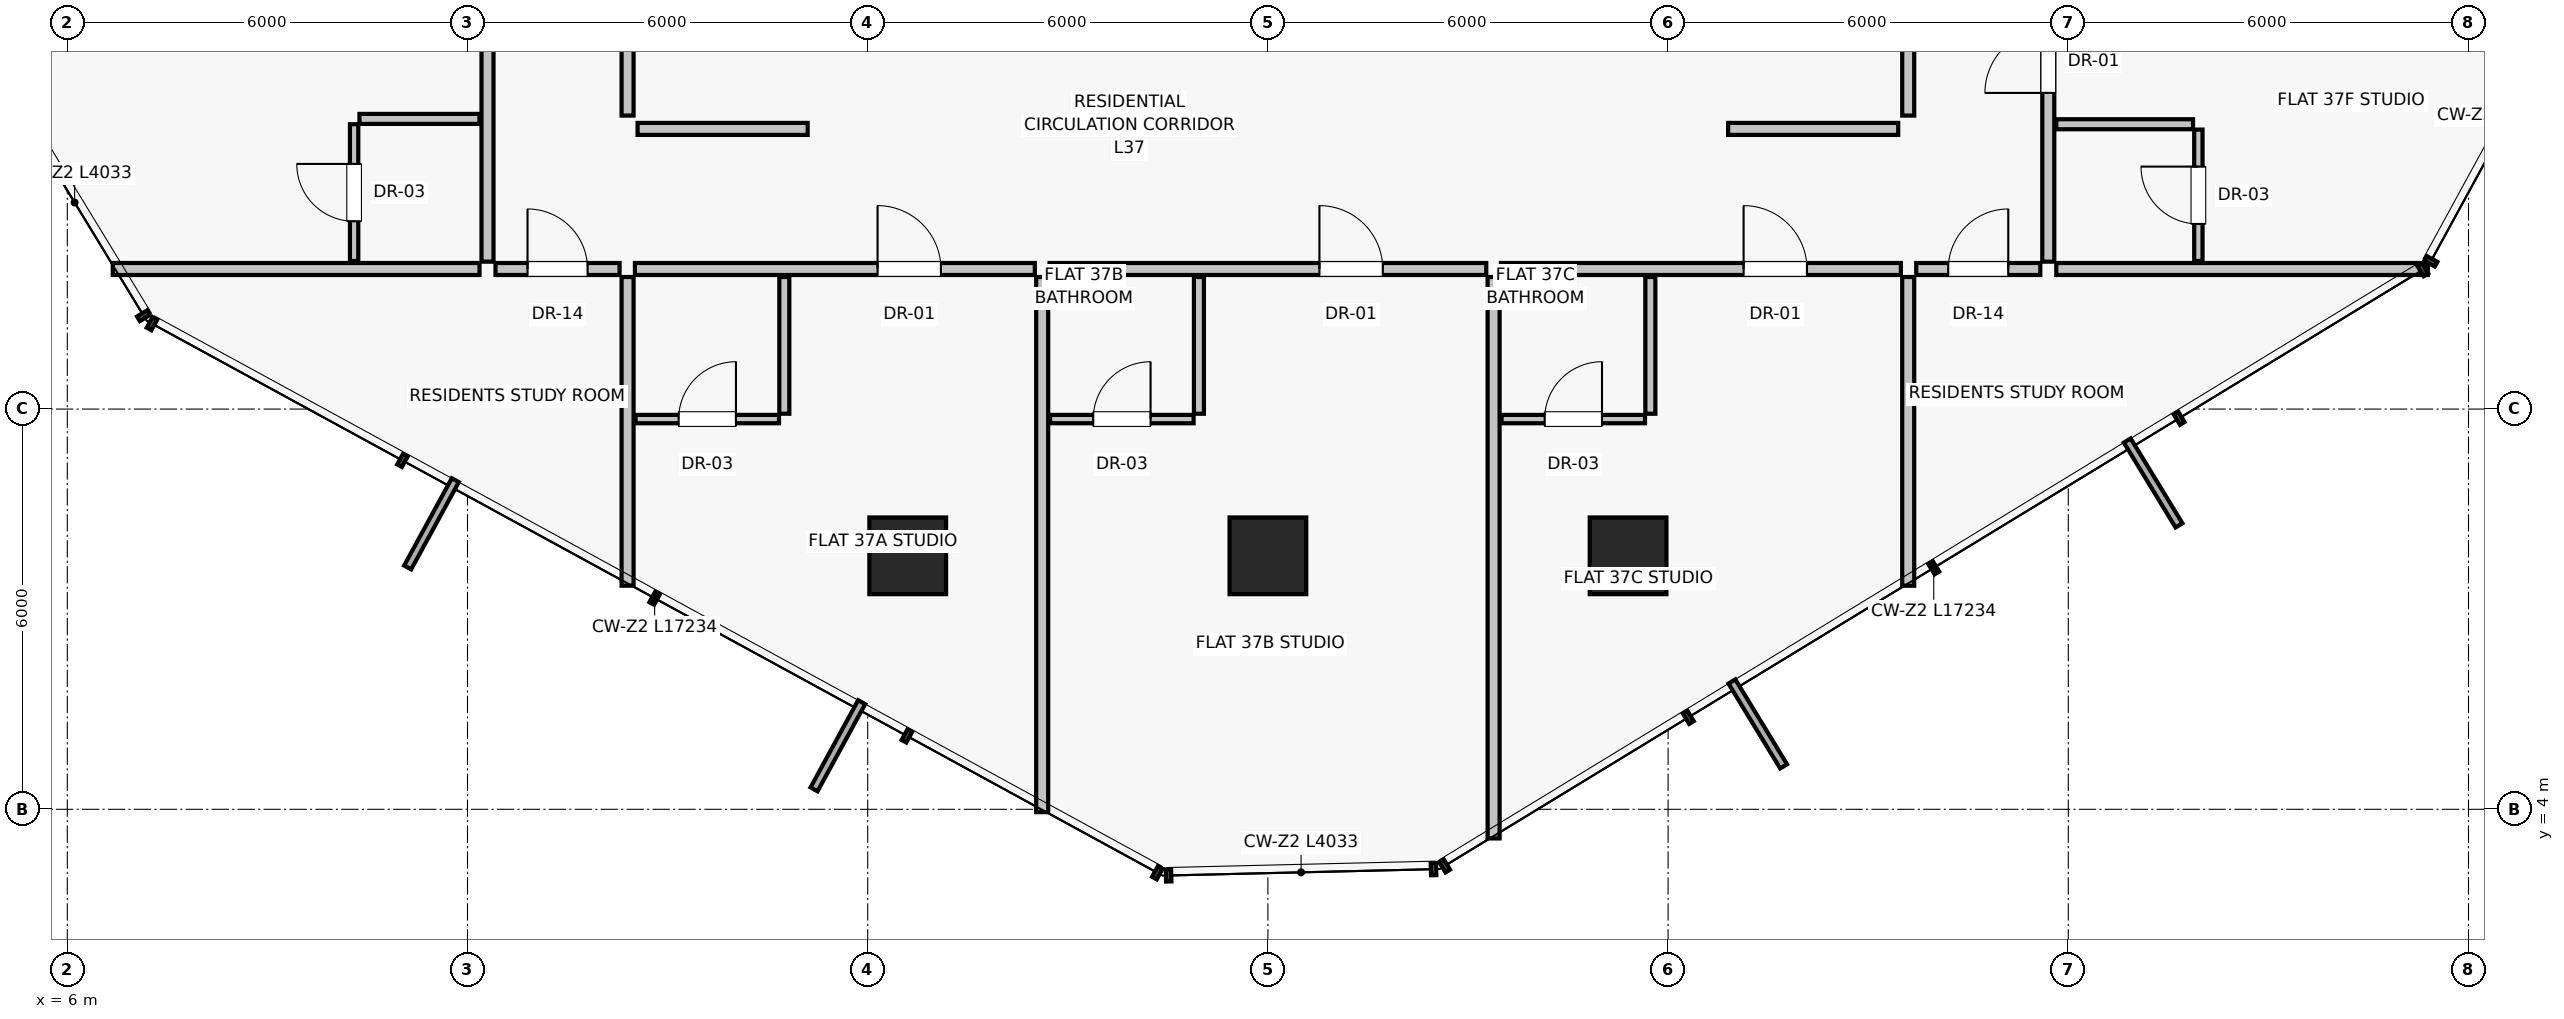
"""IFC4 building model, lengths in metres.
Left out: names, types, materials, properties, quantities, classifications, styles, units other than length and angle.
Written with IfcOpenShell. Run it as: python <this file> out.ifc"""

import sys

from ifc_helpers import new_model, si_unit, direction, frame, frame_2d, origin, origin_2d, place, context, subcontext, project, spatial, rectangle, extrude, source, transform, mapped, element, fill, save


model = new_model("IFC4")
c1 = context("Model", 3, precision=1e-05, world=origin(), true_north=direction((0.0, 1.0)))
c2 = subcontext(c1, "Body", "Model", "MODEL_VIEW")
j1 = project(units=[si_unit("LENGTHUNIT", "METRE"), si_unit("PLANEANGLEUNIT", "RADIAN")], contexts=[c1])
p1 = place(None, origin())
s1 = spatial("IfcSite", under=j1, at=p1, CompositionType="ELEMENT")
p2 = place(p1, origin())
s2 = spatial("IfcBuilding", under=s1, at=p2, CompositionType="ELEMENT")
p3 = place(p2, frame((0.0, 0.0, 132.75)))
s3 = spatial("IfcBuildingStorey", under=s2, at=p3, CompositionType="ELEMENT", Elevation=132.75)
for number, where, z_axis, x_axis in (
    (1, (18.6, 7.8, 0.0), (0.0, 0.0, 1.0), (1.0, 0.0, 0.0)),
    (2, (24.0, 7.8, 0.0), (0.0, 0.0, 1.0), (1.0, 0.0, 0.0)),
    (3, (29.4, 7.8, 0.0), (0.0, 0.0, 1.0), (1.0, 0.0, 0.0)),
):
    element("IfcColumn", number, at=place(p3, frame(where, z_axis=z_axis, x_axis=x_axis)), inside=s3, PredefinedType="COLUMN", context=c2, shape_type="SweptSolid", body=[
        extrude(rectangle(XDim=1.15, YDim=1.15, at=origin_2d()), origin(), (0.0, 0.0, 1.0), 3.25),
    ])
p4 = place(p3, frame((14.4, 14.4, 0.0), z_axis=(0.0, 0.0, 1.0), x_axis=(0.0, 1.0, 0.0)))
e4 = element("IfcWall", 4, at=p4, inside=s3, PredefinedType="PARTITIONING", context=c2, shape_type="SweptSolid", body=[
    extrude(rectangle(XDim=9.4, YDim=0.18, at=frame_2d((4.7, 0.0))), origin(), (0.0, 0.0, 1.0), 3.0),
])
p5 = place(p4, frame((3.8, 0.0, 0.0)))
e5 = element("IfcOpeningElement", 5, at=p5, cuts=e4, PredefinedType="OPENING", context=c2, shape_type="SweptSolid", body=[
    extrude(rectangle(XDim=0.9, YDim=2.01, at=frame_2d((0.45, 1.005))), frame((0.0, 0.1, 0.0), z_axis=(0.0, -1.0, 0.0), x_axis=(1.0, 0.0, 0.0)), (0.0, 0.0, 1.0), 0.2),
])
p6 = place(p3, frame((33.6, 14.4, 0.0), z_axis=(0.0, 0.0, 1.0), x_axis=(0.0, 1.0, 0.0)))
e6 = element("IfcWall", 6, at=p6, inside=s3, PredefinedType="PARTITIONING", context=c2, shape_type="SweptSolid", body=[
    extrude(rectangle(XDim=9.4, YDim=0.18, at=frame_2d((4.7, 0.0))), origin(), (0.0, 0.0, 1.0), 3.0),
])
p7 = place(p6, frame((3.8, 0.0, 0.0)))
e7 = element("IfcOpeningElement", 7, at=p7, cuts=e6, PredefinedType="OPENING", context=c2, shape_type="SweptSolid", body=[
    extrude(rectangle(XDim=0.9, YDim=2.01, at=frame_2d((0.45, 1.005))), frame((0.0, 0.1, 0.0), z_axis=(0.0, -1.0, 0.0), x_axis=(1.0, 0.0, 0.0)), (0.0, 0.0, 1.0), 0.2),
])
for number, where, z_axis, x_axis in (
    (8, (14.55, 14.2, 0.0), (0.0, 0.0, 1.0), (1.0, 0.0, 0.0)),
    (9, (30.9, 14.2, 0.0), (0.0, 0.0, 1.0), (1.0, 0.0, 0.0)),
):
    element("IfcWall", number, at=place(p3, frame(where, z_axis=z_axis, x_axis=x_axis)), inside=s3, PredefinedType="PARTITIONING", context=c2, shape_type="SweptSolid", body=[
        extrude(rectangle(XDim=2.55, YDim=0.18, at=frame_2d((1.275, 0.0))), origin(), (0.0, 0.0, 1.0), 3.0),
    ])
p8 = place(p3, frame((14.4, 11.98, 0.0), z_axis=(0.0, 0.0, 1.0), x_axis=(0.0, -1.0, 0.0)))
e10 = element("IfcWall", 10, at=p8, inside=s3, PredefinedType="PARTITIONING", context=c2, shape_type="SweptSolid", body=[
    extrude(rectangle(XDim=4.628, YDim=0.18, at=frame_2d((2.314, 0.0))), origin(), (0.0, 0.0, 1.0), 3.0),
])
p9 = place(p3, frame((33.6, 11.98, 0.0), z_axis=(0.0, 0.0, 1.0), x_axis=(0.0, -1.0, 0.0)))
e11 = element("IfcWall", 11, at=p9, inside=s3, PredefinedType="PARTITIONING", context=c2, shape_type="SweptSolid", body=[
    extrude(rectangle(XDim=4.629, YDim=0.18, at=frame_2d((2.314, 0.0))), origin(), (0.0, 0.0, 1.0), 3.0),
])
p10 = place(p3, frame((14.51, 12.1, 0.0), z_axis=(0.0, 0.0, 1.0), x_axis=(1.0, 0.0, 0.0)))
e12 = element("IfcWall", 12, at=p10, inside=s3, PredefinedType="PARTITIONING", context=c2, shape_type="SweptSolid", body=[
    extrude(rectangle(XDim=5.996, YDim=0.18, at=frame_2d((2.998, 0.0))), origin(), (0.0, 0.0, 1.0), 2.58),
])
p11 = place(p10, frame((3.638, 0.0, 0.0)))
e13 = element("IfcOpeningElement", 13, at=p11, cuts=e12, PredefinedType="OPENING", context=c2, shape_type="SweptSolid", body=[
    extrude(rectangle(XDim=0.95, YDim=2.02, at=frame_2d((0.475, 1.01))), frame((0.0, 0.1, 0.0), z_axis=(0.0, -1.0, 0.0), x_axis=(1.0, 0.0, 0.0)), (0.0, 0.0, 1.0), 0.2),
])
p12 = place(p3, frame((16.75, 11.98, 0.0), z_axis=(0.0, 0.0, 1.0), x_axis=(0.0, -1.0, 0.0)))
e14 = element("IfcWall", 14, at=p12, inside=s3, PredefinedType="PARTITIONING", context=c2, shape_type="SweptSolid", body=[
    extrude(rectangle(XDim=2.05, YDim=0.15, at=frame_2d((1.025, 0.0))), origin(), (0.0, 0.0, 1.0), 3.0),
])
p13 = place(p3, frame((14.52, 9.85, 0.0), z_axis=(0.0, 0.0, 1.0), x_axis=(1.0, 0.0, 0.0)))
e15 = element("IfcWall", 15, at=p13, inside=s3, PredefinedType="PARTITIONING", context=c2, shape_type="SweptSolid", body=[
    extrude(rectangle(XDim=2.15, YDim=0.125, at=frame_2d((1.075, 0.0))), origin(), (0.0, 0.0, 1.0), 3.0),
])
p14 = place(p13, frame((0.645, 0.0, 0.0)))
e16 = element("IfcOpeningElement", 16, at=p14, cuts=e15, PredefinedType="OPENING", context=c2, shape_type="SweptSolid", body=[
    extrude(rectangle(XDim=0.86, YDim=2.01, at=frame_2d((0.43, 1.005))), frame((0.0, 0.073, 0.0), z_axis=(0.0, -1.0, 0.0), x_axis=(1.0, 0.0, 0.0)), (0.0, 0.0, 1.0), 0.145),
])
p15 = place(p3, frame((20.616, 11.98, 0.0), z_axis=(0.0, 0.0, 1.0), x_axis=(0.0, -1.0, 0.0)))
e17 = element("IfcWall", 17, at=p15, inside=s3, PredefinedType="PARTITIONING", context=c2, shape_type="SweptSolid", body=[
    extrude(rectangle(XDim=8.023, YDim=0.18, at=frame_2d((4.011, 0.0))), origin(), (0.0, 0.0, 1.0), 3.0),
])
p16 = place(p3, frame((20.726, 12.1, 0.0), z_axis=(0.0, 0.0, 1.0), x_axis=(1.0, 0.0, 0.0)))
e18 = element("IfcWall", 18, at=p16, inside=s3, PredefinedType="PARTITIONING", context=c2, shape_type="SweptSolid", body=[
    extrude(rectangle(XDim=6.548, YDim=0.18, at=frame_2d((3.274, 0.0))), origin(), (0.0, 0.0, 1.0), 2.58),
])
p17 = place(p16, frame((4.046, 0.0, 0.0)))
e19 = element("IfcOpeningElement", 19, at=p17, cuts=e18, PredefinedType="OPENING", context=c2, shape_type="SweptSolid", body=[
    extrude(rectangle(XDim=0.95, YDim=2.02, at=frame_2d((0.475, 1.01))), frame((0.0, 0.1, 0.0), z_axis=(0.0, -1.0, 0.0), x_axis=(1.0, 0.0, 0.0)), (0.0, 0.0, 1.0), 0.2),
])
p18 = place(p3, frame((22.966, 11.98, 0.0), z_axis=(0.0, 0.0, 1.0), x_axis=(0.0, -1.0, 0.0)))
e20 = element("IfcWall", 20, at=p18, inside=s3, PredefinedType="PARTITIONING", context=c2, shape_type="SweptSolid", body=[
    extrude(rectangle(XDim=2.05, YDim=0.15, at=frame_2d((1.025, 0.0))), origin(), (0.0, 0.0, 1.0), 3.0),
])
p19 = place(p3, frame((20.736, 9.85, 0.0), z_axis=(0.0, 0.0, 1.0), x_axis=(1.0, 0.0, 0.0)))
e21 = element("IfcWall", 21, at=p19, inside=s3, PredefinedType="PARTITIONING", context=c2, shape_type="SweptSolid", body=[
    extrude(rectangle(XDim=2.15, YDim=0.125, at=frame_2d((1.075, 0.0))), origin(), (0.0, 0.0, 1.0), 3.0),
])
p20 = place(p19, frame((0.645, 0.0, 0.0)))
e22 = element("IfcOpeningElement", 22, at=p20, cuts=e21, PredefinedType="OPENING", context=c2, shape_type="SweptSolid", body=[
    extrude(rectangle(XDim=0.86, YDim=2.01, at=frame_2d((0.43, 1.005))), frame((0.0, 0.073, 0.0), z_axis=(0.0, -1.0, 0.0), x_axis=(1.0, 0.0, 0.0)), (0.0, 0.0, 1.0), 0.145),
])
p21 = place(p3, frame((27.384, 11.98, 0.0), z_axis=(0.0, 0.0, 1.0), x_axis=(0.0, -1.0, 0.0)))
e23 = element("IfcWall", 23, at=p21, inside=s3, PredefinedType="PARTITIONING", context=c2, shape_type="SweptSolid", body=[
    extrude(rectangle(XDim=8.417, YDim=0.18, at=frame_2d((4.208, 0.0))), origin(), (0.0, 0.0, 1.0), 3.0),
])
p22 = place(p3, frame((27.494, 12.1, 0.0), z_axis=(0.0, 0.0, 1.0), x_axis=(1.0, 0.0, 0.0)))
e24 = element("IfcWall", 24, at=p22, inside=s3, PredefinedType="PARTITIONING", context=c2, shape_type="SweptSolid", body=[
    extrude(rectangle(XDim=5.996, YDim=0.18, at=frame_2d((2.998, 0.0))), origin(), (0.0, 0.0, 1.0), 2.58),
])
p23 = place(p22, frame((3.638, 0.0, 0.0)))
e25 = element("IfcOpeningElement", 25, at=p23, cuts=e24, PredefinedType="OPENING", context=c2, shape_type="SweptSolid", body=[
    extrude(rectangle(XDim=0.95, YDim=2.02, at=frame_2d((0.475, 1.01))), frame((0.0, 0.1, 0.0), z_axis=(0.0, -1.0, 0.0), x_axis=(1.0, 0.0, 0.0)), (0.0, 0.0, 1.0), 0.2),
])
p24 = place(p3, frame((29.734, 11.98, 0.0), z_axis=(0.0, 0.0, 1.0), x_axis=(0.0, -1.0, 0.0)))
e26 = element("IfcWall", 26, at=p24, inside=s3, PredefinedType="PARTITIONING", context=c2, shape_type="SweptSolid", body=[
    extrude(rectangle(XDim=2.05, YDim=0.15, at=frame_2d((1.025, 0.0))), origin(), (0.0, 0.0, 1.0), 2.378),
])
p25 = place(p3, frame((27.504, 9.85, 0.0), z_axis=(0.0, 0.0, 1.0), x_axis=(1.0, 0.0, 0.0)))
e27 = element("IfcWall", 27, at=p25, inside=s3, PredefinedType="PARTITIONING", context=c2, shape_type="SweptSolid", body=[
    extrude(rectangle(XDim=2.15, YDim=0.125, at=frame_2d((1.075, 0.0))), origin(), (0.0, 0.0, 1.0), 3.0),
])
p26 = place(p25, frame((0.645, 0.0, 0.0)))
e28 = element("IfcOpeningElement", 28, at=p26, cuts=e27, PredefinedType="OPENING", context=c2, shape_type="SweptSolid", body=[
    extrude(rectangle(XDim=0.86, YDim=2.01, at=frame_2d((0.43, 1.005))), frame((0.0, 0.073, 0.0), z_axis=(0.0, -1.0, 0.0), x_axis=(1.0, 0.0, 0.0)), (0.0, 0.0, 1.0), 0.145),
])
p27 = place(p3, frame((12.18, 12.1, 0.0), z_axis=(0.0, 0.0, 1.0), x_axis=(-1.0, 0.0, 0.0)))
e29 = element("IfcWall", 29, at=p27, inside=s3, PredefinedType="PARTITIONING", context=c2, shape_type="SweptSolid", body=[
    extrude(rectangle(XDim=5.498, YDim=0.18, at=frame_2d((2.749, 0.0))), origin(), (0.0, 0.0, 1.0), 3.0),
])
p28 = place(p3, frame((12.3, 12.21, 0.0), z_axis=(0.0, 0.0, 1.0), x_axis=(0.0, 1.0, 0.0)))
e30 = element("IfcWall", 30, at=p28, inside=s3, PredefinedType="PARTITIONING", context=c2, shape_type="SweptSolid", body=[
    extrude(rectangle(XDim=13.308, YDim=0.18, at=frame_2d((6.654, 0.0))), origin(), (0.0, 0.0, 1.0), 2.58),
])
p29 = place(p28, frame((4.26, 0.0, 0.0)))
e31 = element("IfcOpeningElement", 31, at=p29, cuts=e30, PredefinedType="OPENING", context=c2, shape_type="SweptSolid", body=[
    extrude(rectangle(XDim=0.95, YDim=2.02, at=frame_2d((0.475, 1.01))), frame((0.0, 0.1, 0.0), z_axis=(0.0, -1.0, 0.0), x_axis=(1.0, 0.0, 0.0)), (0.0, 0.0, 1.0), 0.2),
])
p30 = place(p3, frame((12.18, 14.35, 0.0), z_axis=(0.0, 0.0, 1.0), x_axis=(-1.0, 0.0, 0.0)))
e32 = element("IfcWall", 32, at=p30, inside=s3, PredefinedType="PARTITIONING", context=c2, shape_type="SweptSolid", body=[
    extrude(rectangle(XDim=1.8, YDim=0.15, at=frame_2d((0.9, 0.0))), origin(), (0.0, 0.0, 1.0), 3.0),
])
p31 = place(p3, frame((10.3, 12.22, 0.0), z_axis=(0.0, 0.0, 1.0), x_axis=(0.0, 1.0, 0.0)))
e33 = element("IfcWall", 33, at=p31, inside=s3, PredefinedType="PARTITIONING", context=c2, shape_type="SweptSolid", body=[
    extrude(rectangle(XDim=2.05, YDim=0.125, at=frame_2d((1.025, 0.0))), origin(), (0.0, 0.0, 1.0), 3.0),
])
p32 = place(p31, frame((0.595, 0.0, 0.0)))
e34 = element("IfcOpeningElement", 34, at=p32, cuts=e33, PredefinedType="OPENING", context=c2, shape_type="SweptSolid", body=[
    extrude(rectangle(XDim=0.86, YDim=2.01, at=frame_2d((0.43, 1.005))), frame((0.0, 0.073, 0.0), z_axis=(0.0, -1.0, 0.0), x_axis=(1.0, 0.0, 0.0)), (0.0, 0.0, 1.0), 0.145),
])
p33 = place(p3, frame((35.82, 12.1, 0.0), z_axis=(0.0, 0.0, 1.0), x_axis=(1.0, 0.0, 0.0)))
e35 = element("IfcWall", 35, at=p33, inside=s3, PredefinedType="PARTITIONING", context=c2, shape_type="SweptSolid", body=[
    extrude(rectangle(XDim=5.572, YDim=0.18, at=frame_2d((2.786, 0.0))), origin(), (0.0, 0.0, 1.0), 3.0),
])
p34 = place(p3, frame((35.7, 12.21, 0.0), z_axis=(0.0, 0.0, 1.0), x_axis=(0.0, 1.0, 0.0)))
e36 = element("IfcWall", 36, at=p34, inside=s3, PredefinedType="PARTITIONING", context=c2, shape_type="SweptSolid", body=[
    extrude(rectangle(XDim=4.498, YDim=0.18, at=frame_2d((2.249, 0.0))), origin(), (0.0, 0.0, 1.0), 3.0),
])
p35 = place(p34, frame((2.53, 0.0, 0.0)))
e37 = element("IfcOpeningElement", 37, at=p35, cuts=e36, PredefinedType="OPENING", context=c2, shape_type="SweptSolid", body=[
    extrude(rectangle(XDim=0.95, YDim=2.02, at=frame_2d((0.475, 1.01))), frame((0.0, 0.1, 0.0), z_axis=(0.0, -1.0, 0.0), x_axis=(1.0, 0.0, 0.0)), (0.0, 0.0, 1.0), 0.2),
])
p36 = place(p3, frame((35.82, 14.27, 0.0), z_axis=(0.0, 0.0, 1.0), x_axis=(1.0, 0.0, 0.0)))
e38 = element("IfcWall", 38, at=p36, inside=s3, PredefinedType="PARTITIONING", context=c2, shape_type="SweptSolid", body=[
    extrude(rectangle(XDim=2.05, YDim=0.15, at=frame_2d((1.025, 0.0))), origin(), (0.0, 0.0, 1.0), 3.0),
])
p37 = place(p3, frame((37.95, 12.22, 0.0), z_axis=(0.0, 0.0, 1.0), x_axis=(0.0, 1.0, 0.0)))
e39 = element("IfcWall", 39, at=p37, inside=s3, PredefinedType="PARTITIONING", context=c2, shape_type="SweptSolid", body=[
    extrude(rectangle(XDim=1.97, YDim=0.125, at=frame_2d((0.985, 0.0))), origin(), (0.0, 0.0, 1.0), 3.0),
])
p38 = place(p37, frame((0.555, 0.0, 0.0)))
e40 = element("IfcOpeningElement", 40, at=p38, cuts=e39, PredefinedType="OPENING", context=c2, shape_type="SweptSolid", body=[
    extrude(rectangle(XDim=0.86, YDim=2.01, at=frame_2d((0.43, 1.005))), frame((0.0, 0.073, 0.0), z_axis=(0.0, -1.0, 0.0), x_axis=(1.0, 0.0, 0.0)), (0.0, 0.0, 1.0), 0.145),
])
p39 = place(p3, frame((12.42, 12.1, 0.0), z_axis=(0.0, 0.0, 1.0), x_axis=(1.0, 0.0, 0.0)))
e41 = element("IfcWall", 41, at=p39, inside=s3, PredefinedType="PARTITIONING", context=c2, shape_type="SweptSolid", body=[
    extrude(rectangle(XDim=1.86, YDim=0.18, at=frame_2d((0.93, 0.0))), origin(), (0.0, 0.0, 1.0), 3.0),
])
p40 = place(p39, frame((0.48, 0.0, 0.0)))
e42 = element("IfcOpeningElement", 42, at=p40, cuts=e41, PredefinedType="OPENING", context=c2, shape_type="SweptSolid", body=[
    extrude(rectangle(XDim=0.9, YDim=2.01, at=frame_2d((0.45, 1.005))), frame((0.0, 0.1, 0.0), z_axis=(0.0, -1.0, 0.0), x_axis=(1.0, 0.0, 0.0)), (0.0, 0.0, 1.0), 0.2),
])
p41 = place(p3, frame((33.72, 12.1, 0.0), z_axis=(0.0, 0.0, 1.0), x_axis=(1.0, 0.0, 0.0)))
e43 = element("IfcWall", 43, at=p41, inside=s3, PredefinedType="PARTITIONING", context=c2, shape_type="SweptSolid", body=[
    extrude(rectangle(XDim=1.86, YDim=0.18, at=frame_2d((0.93, 0.0))), origin(), (0.0, 0.0, 1.0), 3.0),
])
p42 = place(p41, frame((0.48, 0.0, 0.0)))
e44 = element("IfcOpeningElement", 44, at=p42, cuts=e43, PredefinedType="OPENING", context=c2, shape_type="SweptSolid", body=[
    extrude(rectangle(XDim=0.9, YDim=2.01, at=frame_2d((0.45, 1.005))), frame((0.0, 0.1, 0.0), z_axis=(0.0, -1.0, 0.0), x_axis=(1.0, 0.0, 0.0)), (0.0, 0.0, 1.0), 0.2),
])
m1 = source(origin(), c2, "Body", "SweptSolid", [
    extrude(rectangle(XDim=0.95, YDim=2.02, at=frame_2d((0.475, 1.01))), frame((0.0, 0.025, 0.0), z_axis=(0.0, -1.0, 0.0), x_axis=(1.0, 0.0, 0.0)), (0.0, 0.0, 1.0), 0.05),
])
p43 = place(p11, origin())
e45 = element("IfcDoor", 45, at=p43, inside=s3, OperationType="SINGLE_SWING_LEFT", PredefinedType="DOOR", context=c2, shape_type="MappedRepresentation", body=[
    mapped(m1, transform((0.0, 0.0, 0.0), scale=1.0)),
])
fill(e13, e45)
m2 = source(origin(), c2, "Body", "SweptSolid", [
    extrude(rectangle(XDim=0.86, YDim=2.01, at=frame_2d((0.43, 1.005))), frame((0.0, 0.025, 0.0), z_axis=(0.0, -1.0, 0.0), x_axis=(1.0, 0.0, 0.0)), (0.0, 0.0, 1.0), 0.05),
])
p44 = place(p14, origin())
e46 = element("IfcDoor", 46, at=p44, inside=s3, OperationType="SINGLE_SWING_RIGHT", PredefinedType="DOOR", context=c2, shape_type="MappedRepresentation", body=[
    mapped(m2, transform((0.0, 0.0, 0.0), scale=1.0)),
])
fill(e16, e46)
p45 = place(p17, origin())
e47 = element("IfcDoor", 47, at=p45, inside=s3, OperationType="SINGLE_SWING_LEFT", PredefinedType="DOOR", context=c2, shape_type="MappedRepresentation", body=[
    mapped(m1, transform((0.0, 0.0, 0.0), scale=1.0)),
])
fill(e19, e47)
p46 = place(p20, origin())
e48 = element("IfcDoor", 48, at=p46, inside=s3, OperationType="SINGLE_SWING_RIGHT", PredefinedType="DOOR", context=c2, shape_type="MappedRepresentation", body=[
    mapped(m2, transform((0.0, 0.0, 0.0), scale=1.0)),
])
fill(e22, e48)
p47 = place(p23, origin())
e49 = element("IfcDoor", 49, at=p47, inside=s3, OperationType="SINGLE_SWING_LEFT", PredefinedType="DOOR", context=c2, shape_type="MappedRepresentation", body=[
    mapped(m1, transform((0.0, 0.0, 0.0), scale=1.0)),
])
fill(e25, e49)
p48 = place(p26, origin())
e50 = element("IfcDoor", 50, at=p48, inside=s3, OperationType="SINGLE_SWING_RIGHT", PredefinedType="DOOR", context=c2, shape_type="MappedRepresentation", body=[
    mapped(m2, transform((0.0, 0.0, 0.0), scale=1.0)),
])
fill(e28, e50)
p49 = place(p32, origin())
e51 = element("IfcDoor", 51, at=p49, inside=s3, OperationType="SINGLE_SWING_RIGHT", PredefinedType="DOOR", context=c2, shape_type="MappedRepresentation", body=[
    mapped(m2, transform((0.0, 0.0, 0.0), scale=1.0)),
])
fill(e34, e51)
p50 = place(p35, origin())
e52 = element("IfcDoor", 52, at=p50, inside=s3, OperationType="SINGLE_SWING_LEFT", PredefinedType="DOOR", context=c2, shape_type="MappedRepresentation", body=[
    mapped(m1, transform((0.0, 0.0, 0.0), scale=1.0)),
])
fill(e37, e52)
p51 = place(p38, origin())
e53 = element("IfcDoor", 53, at=p51, inside=s3, OperationType="SINGLE_SWING_RIGHT", PredefinedType="DOOR", context=c2, shape_type="MappedRepresentation", body=[
    mapped(m2, transform((0.0, 0.0, 0.0), scale=1.0)),
])
fill(e40, e53)
m3 = source(origin(), c2, "Body", "SweptSolid", [
    extrude(rectangle(XDim=0.9, YDim=2.01, at=frame_2d((0.45, 1.005))), frame((0.0, 0.025, 0.0), z_axis=(0.0, -1.0, 0.0), x_axis=(1.0, 0.0, 0.0)), (0.0, 0.0, 1.0), 0.05),
])
p52 = place(p40, origin())
e54 = element("IfcDoor", 54, at=p52, inside=s3, OperationType="SINGLE_SWING_LEFT", PredefinedType="DOOR", context=c2, shape_type="MappedRepresentation", body=[
    mapped(m3, transform((0.0, 0.0, 0.0), scale=1.0)),
])
fill(e42, e54)
p53 = place(p42, origin())
e55 = element("IfcDoor", 55, at=p53, inside=s3, OperationType="SINGLE_SWING_RIGHT", PredefinedType="DOOR", context=c2, shape_type="MappedRepresentation", body=[
    mapped(m3, transform((0.0, 0.0, 0.0), scale=1.0)),
])
fill(e44, e55)
save(model, sys.argv[1])
